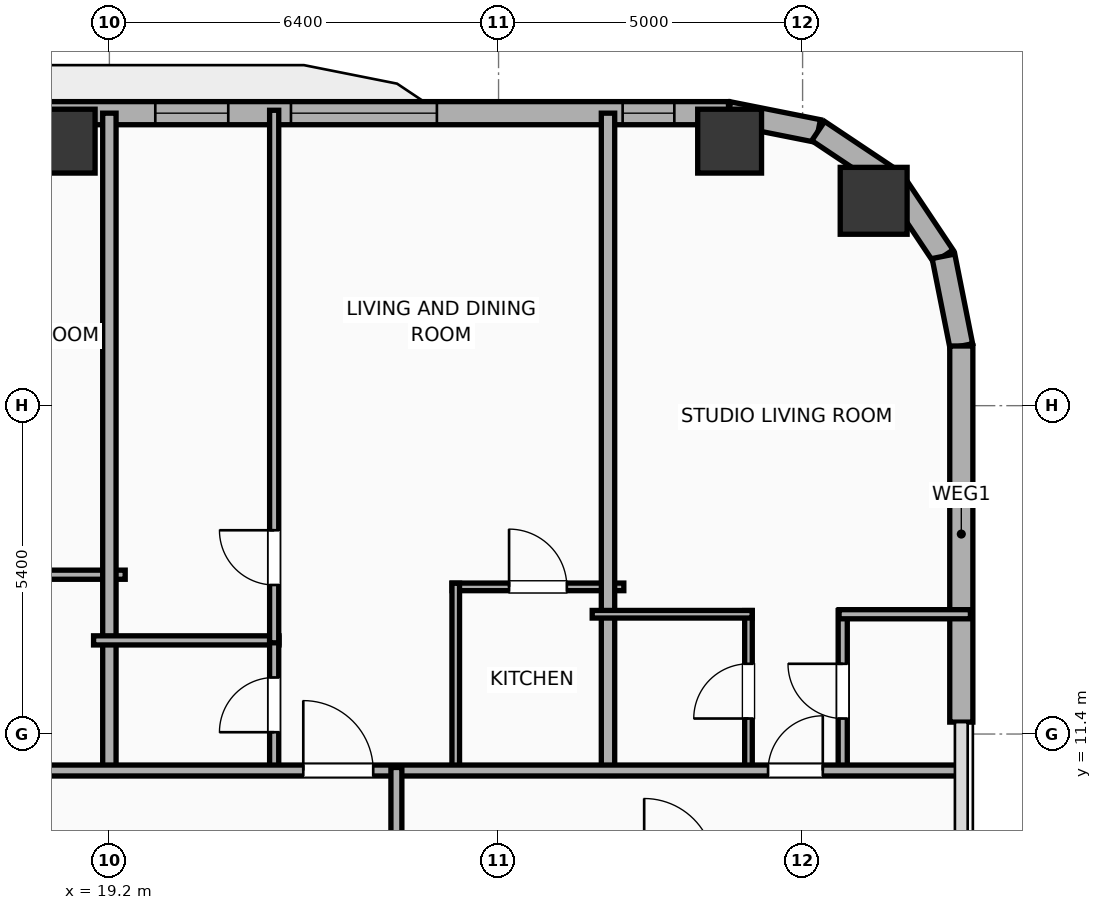
"""IFC4 building model, lengths in metres.
Left out: names, types, materials, properties, quantities, classifications, styles, units other than length and angle.
Written with IfcOpenShell. Run it as: python <this file> out.ifc"""

import sys

from ifc_helpers import new_model, si_unit, direction, frame, frame_2d, origin, origin_2d, place, context, subcontext, project, spatial, rectangle, hollow_rectangle, hollow_circle, extrude, element, fill, save


model = new_model("IFC4")
c1 = context("Model", 3, precision=1e-05, world=origin(), true_north=direction((0.0, 1.0)))
c2 = subcontext(c1, "Body", "Model", "MODEL_VIEW")
j1 = project(units=[si_unit("LENGTHUNIT", "METRE"), si_unit("PLANEANGLEUNIT", "RADIAN")], contexts=[c1])
p1 = place(None, origin())
s1 = spatial("IfcSite", under=j1, at=p1, CompositionType="ELEMENT")
p2 = place(p1, origin())
s2 = spatial("IfcBuilding", under=s1, at=p2, CompositionType="ELEMENT")
p3 = place(p2, frame((0.0, 0.0, 85.8)))
s3 = spatial("IfcBuildingStorey", under=s2, at=p3, CompositionType="ELEMENT", Elevation=85.8)
p4 = place(p3, frame((31.769, 20.169, -0.4), z_axis=(0.0, 0.0, 1.0), x_axis=(1.0, 0.0, 0.0)))
e1 = element("IfcColumn", 1, at=p4, inside=s3, PredefinedType="COLUMN", context=c2, shape_type="SweptSolid", body=[
    extrude(hollow_circle(Radius=0.55, WallThickness=0.036, at=origin_2d()), origin(), (0.0, 0.0, 1.0), 4.3),
])
for number, where, z_axis, x_axis in (
    (2, (29.4, 21.15, -0.4), (0.0, 0.0, 1.0), (1.0, 0.0, 0.0)),
    (3, (18.44, 21.15, -0.4), (0.0, 0.0, 1.0), (1.0, 0.0, 0.0)),
):
    element("IfcColumn", number, at=place(p3, frame(where, z_axis=z_axis, x_axis=x_axis)), inside=s3, PredefinedType="COLUMN", context=c2, shape_type="SweptSolid", body=[
        extrude(hollow_rectangle(XDim=1.05, YDim=1.05, WallThickness=0.036, at=origin_2d()), origin(), (0.0, 0.0, 1.0), 4.3),
    ])
p5 = place(p3, frame((-25.381, 21.61, 0.0), z_axis=(0.0, 0.0, 1.0), x_axis=(1.0, 0.0, 0.0)))
e4 = element("IfcWall", 4, at=p5, inside=s3, PredefinedType="ELEMENTEDWALL", context=c2, shape_type="SweptSolid", body=[
    extrude(rectangle(XDim=54.763, YDim=0.38, at=frame_2d((27.381, 0.0))), origin(), (0.0, 0.0, 1.0), 2.54),
])
p6 = place(p5, frame((5.645, 0.0, 0.75)))
e5 = element("IfcOpeningElement", 5, at=p6, cuts=e4, PredefinedType="OPENING", context=c2, shape_type="SweptSolid", body=[
    extrude(rectangle(XDim=2.4, YDim=1.45, at=frame_2d((1.2, 0.725))), frame((0.0, 0.2, 0.0), z_axis=(0.0, -1.0, 0.0), x_axis=(1.0, 0.0, 0.0)), (0.0, 0.0, 1.0), 0.4),
])
p7 = place(p5, frame((47.567, 0.0, 0.75)))
e6 = element("IfcOpeningElement", 6, at=p7, cuts=e4, PredefinedType="OPENING", context=c2, shape_type="SweptSolid", body=[
    extrude(rectangle(XDim=2.4, YDim=1.45, at=frame_2d((1.2, 0.725))), frame((0.0, 0.2, 0.0), z_axis=(0.0, -1.0, 0.0), x_axis=(1.0, 0.0, 0.0)), (0.0, 0.0, 1.0), 0.4),
])
p8 = place(p5, frame((1.635, 0.0, 0.55)))
e7 = element("IfcOpeningElement", 7, at=p8, cuts=e4, PredefinedType="OPENING", context=c2, shape_type="SweptSolid", body=[
    extrude(rectangle(XDim=1.2, YDim=1.15, at=frame_2d((0.6, 0.575))), frame((0.0, 0.2, 0.0), z_axis=(0.0, -1.0, 0.0), x_axis=(1.0, 0.0, 0.0)), (0.0, 0.0, 1.0), 0.4),
])
p9 = place(p5, frame((8.996, 0.0, 0.55)))
e8 = element("IfcOpeningElement", 8, at=p9, cuts=e4, PredefinedType="OPENING", context=c2, shape_type="SweptSolid", body=[
    extrude(rectangle(XDim=1.2, YDim=1.15, at=frame_2d((0.6, 0.575))), frame((0.0, 0.2, 0.0), z_axis=(0.0, -1.0, 0.0), x_axis=(1.0, 0.0, 0.0)), (0.0, 0.0, 1.0), 0.4),
])
p10 = place(p5, frame((13.576, 0.0, 0.55)))
e9 = element("IfcOpeningElement", 9, at=p10, cuts=e4, PredefinedType="OPENING", context=c2, shape_type="SweptSolid", body=[
    extrude(rectangle(XDim=1.2, YDim=1.15, at=frame_2d((0.6, 0.575))), frame((0.0, 0.2, 0.0), z_axis=(0.0, -1.0, 0.0), x_axis=(1.0, 0.0, 0.0)), (0.0, 0.0, 1.0), 0.4),
])
p11 = place(p5, frame((17.676, 0.0, 0.55)))
e10 = element("IfcOpeningElement", 10, at=p11, cuts=e4, PredefinedType="OPENING", context=c2, shape_type="SweptSolid", body=[
    extrude(rectangle(XDim=1.2, YDim=1.15, at=frame_2d((0.6, 0.575))), frame((0.0, 0.2, 0.0), z_axis=(0.0, -1.0, 0.0), x_axis=(1.0, 0.0, 0.0)), (0.0, 0.0, 1.0), 0.4),
])
p12 = place(p5, frame((20.319, 0.0, 0.55)))
e11 = element("IfcOpeningElement", 11, at=p12, cuts=e4, PredefinedType="OPENING", context=c2, shape_type="SweptSolid", body=[
    extrude(rectangle(XDim=0.85, YDim=1.15, at=frame_2d((0.425, 0.575))), frame((0.0, 0.2, 0.0), z_axis=(0.0, -1.0, 0.0), x_axis=(1.0, 0.0, 0.0)), (0.0, 0.0, 1.0), 0.4),
])
p13 = place(p5, frame((24.844, 0.0, 0.55)))
e12 = element("IfcOpeningElement", 12, at=p13, cuts=e4, PredefinedType="OPENING", context=c2, shape_type="SweptSolid", body=[
    extrude(rectangle(XDim=1.2, YDim=1.15, at=frame_2d((0.6, 0.575))), frame((0.0, 0.2, 0.0), z_axis=(0.0, -1.0, 0.0), x_axis=(1.0, 0.0, 0.0)), (0.0, 0.0, 1.0), 0.4),
])
p14 = place(p5, frame((29.976, 0.0, 0.55)))
e13 = element("IfcOpeningElement", 13, at=p14, cuts=e4, PredefinedType="OPENING", context=c2, shape_type="SweptSolid", body=[
    extrude(rectangle(XDim=1.2, YDim=1.15, at=frame_2d((0.6, 0.575))), frame((0.0, 0.2, 0.0), z_axis=(0.0, -1.0, 0.0), x_axis=(1.0, 0.0, 0.0)), (0.0, 0.0, 1.0), 0.4),
])
p15 = place(p5, frame((34.076, 0.0, 0.55)))
e14 = element("IfcOpeningElement", 14, at=p15, cuts=e4, PredefinedType="OPENING", context=c2, shape_type="SweptSolid", body=[
    extrude(rectangle(XDim=1.2, YDim=1.15, at=frame_2d((0.6, 0.575))), frame((0.0, 0.2, 0.0), z_axis=(0.0, -1.0, 0.0), x_axis=(1.0, 0.0, 0.0)), (0.0, 0.0, 1.0), 0.4),
])
p16 = place(p5, frame((38.176, 0.0, 0.55)))
e15 = element("IfcOpeningElement", 15, at=p16, cuts=e4, PredefinedType="OPENING", context=c2, shape_type="SweptSolid", body=[
    extrude(rectangle(XDim=1.2, YDim=1.15, at=frame_2d((0.6, 0.575))), frame((0.0, 0.2, 0.0), z_axis=(0.0, -1.0, 0.0), x_axis=(1.0, 0.0, 0.0)), (0.0, 0.0, 1.0), 0.4),
])
p17 = place(p5, frame((41.796, 0.0, 0.55)))
e16 = element("IfcOpeningElement", 16, at=p17, cuts=e4, PredefinedType="OPENING", context=c2, shape_type="SweptSolid", body=[
    extrude(rectangle(XDim=1.2, YDim=1.15, at=frame_2d((0.6, 0.575))), frame((0.0, 0.2, 0.0), z_axis=(0.0, -1.0, 0.0), x_axis=(1.0, 0.0, 0.0)), (0.0, 0.0, 1.0), 0.4),
])
p18 = place(p5, frame((45.336, 0.0, 0.55)))
e17 = element("IfcOpeningElement", 17, at=p18, cuts=e4, PredefinedType="OPENING", context=c2, shape_type="SweptSolid", body=[
    extrude(rectangle(XDim=1.2, YDim=1.15, at=frame_2d((0.6, 0.575))), frame((0.0, 0.2, 0.0), z_axis=(0.0, -1.0, 0.0), x_axis=(1.0, 0.0, 0.0)), (0.0, 0.0, 1.0), 0.4),
])
p19 = place(p5, frame((53.022, 0.0, 0.55)))
e18 = element("IfcOpeningElement", 18, at=p19, cuts=e4, PredefinedType="OPENING", context=c2, shape_type="SweptSolid", body=[
    extrude(rectangle(XDim=0.85, YDim=1.15, at=frame_2d((0.425, 0.575))), frame((0.0, 0.2, 0.0), z_axis=(0.0, -1.0, 0.0), x_axis=(1.0, 0.0, 0.0)), (0.0, 0.0, 1.0), 0.4),
])
p20 = place(p3, frame((29.381, 21.61, 0.0), z_axis=(0.0, 0.0, 1.0), x_axis=(0.980755066645, -0.195242155415, 0.0)))
e19 = element("IfcWall", 19, at=p20, inside=s3, PredefinedType="ELEMENTEDWALL", context=c2, shape_type="SweptSolid", body=[
    extrude(rectangle(XDim=1.504, YDim=0.38, at=frame_2d((0.752, 0.0))), origin(), (0.0, 0.0, 1.0), 2.54),
])
p21 = place(p3, frame((30.857, 21.316, 0.0), z_axis=(0.0, 0.0, 1.0), x_axis=(0.831468045563, -0.555572577804, 0.0)))
e20 = element("IfcWall", 20, at=p21, inside=s3, PredefinedType="ELEMENTEDWALL", context=c2, shape_type="SweptSolid", body=[
    extrude(rectangle(XDim=1.485, YDim=0.38, at=frame_2d((0.742, 0.0))), origin(), (0.0, 0.0, 1.0), 2.54),
])
p22 = place(p3, frame((32.091, 20.491, 0.0), z_axis=(0.0, 0.0, 1.0), x_axis=(0.555610286119, -0.831442848281, 0.0)))
e21 = element("IfcWall", 21, at=p22, inside=s3, PredefinedType="ELEMENTEDWALL", context=c2, shape_type="SweptSolid", body=[
    extrude(rectangle(XDim=1.485, YDim=0.38, at=frame_2d((0.743, 0.0))), origin(), (0.0, 0.0, 1.0), 3.65),
])
p23 = place(p3, frame((32.917, 19.257, 0.0), z_axis=(0.0, 0.0, 1.0), x_axis=(0.195086038585, -0.980786132421, 0.0)))
e22 = element("IfcWall", 22, at=p23, inside=s3, PredefinedType="ELEMENTEDWALL", context=c2, shape_type="SweptSolid", body=[
    extrude(rectangle(XDim=1.504, YDim=0.38, at=frame_2d((0.752, 0.0))), origin(), (0.0, 0.0, 1.0), 3.65),
])
p24 = place(p3, frame((33.21, 17.781, 0.0), z_axis=(0.0, 0.0, 1.0), x_axis=(0.0, -1.0, 0.0)))
e23 = element("IfcWall", 23, at=p24, inside=s3, PredefinedType="ELEMENTEDWALL", context=c2, shape_type="SweptSolid", body=[
    extrude(rectangle(XDim=6.185, YDim=0.38, at=frame_2d((3.093, 0.0))), origin(), (0.0, 0.0, 1.0), 2.54),
])
p25 = place(p3, frame((15.67, 14.02, 0.0), z_axis=(0.0, 0.0, 1.0), x_axis=(1.0, 0.0, 0.0)))
e24 = element("IfcWall", 24, at=p25, inside=s3, PredefinedType="PLUMBINGWALL", context=c2, shape_type="SweptSolid", body=[
    extrude(rectangle(XDim=3.79, YDim=0.15, at=frame_2d((1.895, 0.0))), origin(), (0.0, 0.0, 1.0), 3.65),
])
p26 = place(p3, frame((19.2, 10.72, 0.0), z_axis=(0.0, 0.0, 1.0), x_axis=(0.0, 1.0, 0.0)))
e25 = element("IfcWall", 25, at=p26, inside=s3, PredefinedType="PARTITIONING", context=c2, shape_type="SweptSolid", body=[
    extrude(rectangle(XDim=10.89, YDim=0.22, at=frame_2d((5.445, 0.0))), origin(), (0.0, 0.0, 1.0), 2.54),
])
p27 = place(p3, frame((18.94, 12.94, 0.0), z_axis=(0.0, 0.0, 1.0), x_axis=(1.0, 0.0, 0.0)))
e26 = element("IfcWall", 26, at=p27, inside=s3, PredefinedType="PLUMBINGWALL", context=c2, shape_type="SweptSolid", body=[
    extrude(rectangle(XDim=3.05, YDim=0.15, at=frame_2d((1.525, 0.0))), origin(), (0.0, 0.0, 1.0), 3.65),
])
p28 = place(p3, frame((21.91, 10.78, 0.0), z_axis=(0.0, 0.0, 1.0), x_axis=(0.0, 1.0, 0.0)))
e27 = element("IfcWall", 27, at=p28, inside=s3, PredefinedType="PLUMBINGWALL", context=c2, shape_type="SweptSolid", body=[
    extrude(rectangle(XDim=2.2, YDim=0.15, at=frame_2d((1.1, 0.0))), origin(), (0.0, 0.0, 1.0), 3.65),
])
p29 = place(p28, frame((0.65, 0.0, 0.0)))
e28 = element("IfcOpeningElement", 28, at=p29, cuts=e27, PredefinedType="OPENING", context=c2, shape_type="SweptSolid", body=[
    extrude(rectangle(XDim=0.9, YDim=2.05, at=frame_2d((0.45, 1.025))), frame((0.0, 0.085, 0.0), z_axis=(0.0, -1.0, 0.0), x_axis=(1.0, 0.0, 0.0)), (0.0, 0.0, 1.0), 0.17),
])
p30 = place(p3, frame((21.91, 12.9, 0.0), z_axis=(0.0, 0.0, 1.0), x_axis=(0.0, 1.0, 0.0)))
e29 = element("IfcWall", 29, at=p30, inside=s3, PredefinedType="PLUMBINGWALL", context=c2, shape_type="SweptSolid", body=[
    extrude(rectangle(XDim=8.758, YDim=0.15, at=frame_2d((4.379, 0.0))), origin(), (0.0, 0.0, 1.0), 3.65),
])
p31 = place(p30, frame((0.951, 0.0, 0.0)))
e30 = element("IfcOpeningElement", 30, at=p31, cuts=e29, PredefinedType="OPENING", context=c2, shape_type="SweptSolid", body=[
    extrude(rectangle(XDim=0.9, YDim=2.05, at=frame_2d((0.45, 1.025))), frame((0.0, 0.085, 0.0), z_axis=(0.0, -1.0, 0.0), x_axis=(1.0, 0.0, 0.0)), (0.0, 0.0, 1.0), 0.17),
])
p32 = place(p3, frame((24.836, 13.82, 0.0), z_axis=(0.0, 0.0, 1.0), x_axis=(1.0, 0.0, 0.0)))
e31 = element("IfcWall", 31, at=p32, inside=s3, PredefinedType="PARTITIONING", context=c2, shape_type="SweptSolid", body=[
    extrude(rectangle(XDim=2.824, YDim=0.125, at=frame_2d((1.412, 0.0))), origin(), (0.0, 0.0, 1.0), 3.65),
])
p33 = place(p32, frame((0.937, 0.0, 0.0)))
e32 = element("IfcOpeningElement", 32, at=p33, cuts=e31, PredefinedType="OPENING", context=c2, shape_type="SweptSolid", body=[
    extrude(rectangle(XDim=0.95, YDim=2.05, at=frame_2d((0.475, 1.025))), frame((0.0, 0.073, 0.0), z_axis=(0.0, -1.0, 0.0), x_axis=(1.0, 0.0, 0.0)), (0.0, 0.0, 1.0), 0.145),
])
p34 = place(p3, frame((24.896, 10.78, 0.0), z_axis=(0.0, 0.0, 1.0), x_axis=(0.0, 1.0, 0.0)))
e33 = element("IfcWall", 33, at=p34, inside=s3, PredefinedType="PARTITIONING", context=c2, shape_type="SweptSolid", body=[
    extrude(rectangle(XDim=3.1, YDim=0.125, at=frame_2d((1.55, 0.0))), origin(), (0.0, 0.0, 1.0), 3.65),
])
p35 = place(p3, frame((27.4, 10.72, 0.0), z_axis=(0.0, 0.0, 1.0), x_axis=(0.0, 1.0, 0.0)))
e34 = element("IfcWall", 34, at=p35, inside=s3, PredefinedType="PARTITIONING", context=c2, shape_type="SweptSolid", body=[
    extrude(rectangle(XDim=10.89, YDim=0.22, at=frame_2d((5.445, 0.0))), origin(), (0.0, 0.0, 1.0), 3.65),
])
p36 = place(p3, frame((29.71, 10.78, 0.0), z_axis=(0.0, 0.0, 1.0), x_axis=(0.0, 1.0, 0.0)))
e35 = element("IfcWall", 35, at=p36, inside=s3, PredefinedType="PARTITIONING", context=c2, shape_type="SweptSolid", body=[
    extrude(rectangle(XDim=2.65, YDim=0.125, at=frame_2d((1.325, 0.0))), origin(), (0.0, 0.0, 1.0), 3.65),
])
p37 = place(p36, frame((0.875, 0.0, 0.0)))
e36 = element("IfcOpeningElement", 36, at=p37, cuts=e35, PredefinedType="OPENING", context=c2, shape_type="SweptSolid", body=[
    extrude(rectangle(XDim=0.9, YDim=2.05, at=frame_2d((0.45, 1.025))), frame((0.0, 0.073, 0.0), z_axis=(0.0, -1.0, 0.0), x_axis=(1.0, 0.0, 0.0)), (0.0, 0.0, 1.0), 0.145),
])
p38 = place(p3, frame((31.26, 10.78, 0.0), z_axis=(0.0, 0.0, 1.0), x_axis=(0.0, 1.0, 0.0)))
e37 = element("IfcWall", 37, at=p38, inside=s3, PredefinedType="PLUMBINGWALL", context=c2, shape_type="SweptSolid", body=[
    extrude(rectangle(XDim=2.65, YDim=0.15, at=frame_2d((1.325, 0.0))), origin(), (0.0, 0.0, 1.0), 3.65),
])
p39 = place(p38, frame((0.875, 0.0, 0.0)))
e38 = element("IfcOpeningElement", 38, at=p39, cuts=e37, PredefinedType="OPENING", context=c2, shape_type="SweptSolid", body=[
    extrude(rectangle(XDim=0.9, YDim=2.05, at=frame_2d((0.45, 1.025))), frame((0.0, 0.085, 0.0), z_axis=(0.0, -1.0, 0.0), x_axis=(1.0, 0.0, 0.0)), (0.0, 0.0, 1.0), 0.17),
])
p40 = place(p3, frame((27.14, 13.37, 0.0), z_axis=(0.0, 0.0, 1.0), x_axis=(1.0, 0.0, 0.0)))
e39 = element("IfcWall", 39, at=p40, inside=s3, PredefinedType="PARTITIONING", context=c2, shape_type="SweptSolid", body=[
    extrude(rectangle(XDim=2.63, YDim=0.125, at=frame_2d((1.315, 0.0))), origin(), (0.0, 0.0, 1.0), 3.65),
])
p41 = place(p3, frame((31.2, 13.37, 0.0), z_axis=(0.0, 0.0, 1.0), x_axis=(1.0, 0.0, 0.0)))
e40 = element("IfcWall", 40, at=p41, inside=s3, PredefinedType="PLUMBINGWALL", context=c2, shape_type="SweptSolid", body=[
    extrude(rectangle(XDim=2.16, YDim=0.15, at=frame_2d((1.08, 0.0))), origin(), (0.0, 0.0, 1.0), 3.65),
])
p42 = place(p3, frame((-29.21, 10.8, 0.0), z_axis=(0.0, 0.0, 1.0), x_axis=(1.0, 0.0, 0.0)))
e41 = element("IfcWall", 41, at=p42, inside=s3, PredefinedType="PARTITIONING", context=c2, shape_type="SweptSolid", body=[
    extrude(rectangle(XDim=62.42, YDim=0.18, at=frame_2d((31.21, 0.0))), origin(), (0.0, 0.0, 1.0), 3.65),
])
p43 = place(p42, frame((3.264, 0.0, 0.0)))
e42 = element("IfcOpeningElement", 42, at=p43, cuts=e41, PredefinedType="OPENING", context=c2, shape_type="SweptSolid", body=[
    extrude(rectangle(XDim=1.15, YDim=2.05, at=frame_2d((0.575, 1.025))), frame((0.0, 0.1, 0.0), z_axis=(0.0, -1.0, 0.0), x_axis=(1.0, 0.0, 0.0)), (0.0, 0.0, 1.0), 0.2),
])
p44 = place(p42, frame((11.116, 0.0, 0.0)))
e43 = element("IfcOpeningElement", 43, at=p44, cuts=e41, PredefinedType="OPENING", context=c2, shape_type="SweptSolid", body=[
    extrude(rectangle(XDim=1.15, YDim=2.05, at=frame_2d((0.575, 1.025))), frame((0.0, 0.1, 0.0), z_axis=(0.0, -1.0, 0.0), x_axis=(1.0, 0.0, 0.0)), (0.0, 0.0, 1.0), 0.2),
])
p45 = place(p42, frame((19.3, 0.0, 0.0)))
e44 = element("IfcOpeningElement", 44, at=p45, cuts=e41, PredefinedType="OPENING", context=c2, shape_type="SweptSolid", body=[
    extrude(rectangle(XDim=1.15, YDim=2.05, at=frame_2d((0.575, 1.025))), frame((0.0, 0.1, 0.0), z_axis=(0.0, -1.0, 0.0), x_axis=(1.0, 0.0, 0.0)), (0.0, 0.0, 1.0), 0.2),
])
p46 = place(p42, frame((27.452, 0.0, 0.0)))
e45 = element("IfcOpeningElement", 45, at=p46, cuts=e41, PredefinedType="OPENING", context=c2, shape_type="SweptSolid", body=[
    extrude(rectangle(XDim=1.15, YDim=2.05, at=frame_2d((0.575, 1.025))), frame((0.0, 0.1, 0.0), z_axis=(0.0, -1.0, 0.0), x_axis=(1.0, 0.0, 0.0)), (0.0, 0.0, 1.0), 0.2),
])
p47 = place(p42, frame((35.697, 0.0, 0.0)))
e46 = element("IfcOpeningElement", 46, at=p47, cuts=e41, PredefinedType="OPENING", context=c2, shape_type="SweptSolid", body=[
    extrude(rectangle(XDim=1.15, YDim=2.05, at=frame_2d((0.575, 1.025))), frame((0.0, 0.1, 0.0), z_axis=(0.0, -1.0, 0.0), x_axis=(1.0, 0.0, 0.0)), (0.0, 0.0, 1.0), 0.2),
])
p48 = place(p42, frame((43.899, 0.0, 0.0)))
e47 = element("IfcOpeningElement", 47, at=p48, cuts=e41, PredefinedType="OPENING", context=c2, shape_type="SweptSolid", body=[
    extrude(rectangle(XDim=1.15, YDim=2.05, at=frame_2d((0.575, 1.025))), frame((0.0, 0.1, 0.0), z_axis=(0.0, -1.0, 0.0), x_axis=(1.0, 0.0, 0.0)), (0.0, 0.0, 1.0), 0.2),
])
p49 = place(p42, frame((51.599, 0.0, 0.0)))
e48 = element("IfcOpeningElement", 48, at=p49, cuts=e41, PredefinedType="OPENING", context=c2, shape_type="SweptSolid", body=[
    extrude(rectangle(XDim=1.15, YDim=2.05, at=frame_2d((0.575, 1.025))), frame((0.0, 0.1, 0.0), z_axis=(0.0, -1.0, 0.0), x_axis=(1.0, 0.0, 0.0)), (0.0, 0.0, 1.0), 0.2),
])
p50 = place(p42, frame((59.242, 0.0, 0.0)))
e49 = element("IfcOpeningElement", 49, at=p50, cuts=e41, PredefinedType="OPENING", context=c2, shape_type="SweptSolid", body=[
    extrude(rectangle(XDim=0.9, YDim=2.05, at=frame_2d((0.45, 1.025))), frame((0.0, 0.1, 0.0), z_axis=(0.0, -1.0, 0.0), x_axis=(1.0, 0.0, 0.0)), (0.0, 0.0, 1.0), 0.2),
])
p51 = place(p3, frame((23.92, -10.85, 0.0), z_axis=(0.0, 0.0, 1.0), x_axis=(0.0, 1.0, 0.0)))
e50 = element("IfcWall", 50, at=p51, inside=s3, PredefinedType="PARTITIONING", context=c2, shape_type="SweptSolid", body=[
    extrude(rectangle(XDim=21.7, YDim=0.18, at=frame_2d((10.85, 0.0))), origin(), (0.0, 0.0, 1.0), 3.65),
])
p52 = place(p51, frame((18.835, 0.0, 0.0)))
e51 = element("IfcOpeningElement", 51, at=p52, cuts=e50, PredefinedType="OPENING", context=c2, shape_type="SweptSolid", body=[
    extrude(rectangle(XDim=0.95, YDim=2.05, at=frame_2d((0.475, 1.025))), frame((0.0, 0.1, 0.0), z_axis=(0.0, -1.0, 0.0), x_axis=(1.0, 0.0, 0.0)), (0.0, 0.0, 1.0), 0.2),
])
p53 = place(p7, origin())
e52 = element("IfcWindow", 52, at=p53, inside=s3, PartitioningType="SINGLE_PANEL", PredefinedType="WINDOW", context=c2, shape_type="SweptSolid", body=[
    extrude(rectangle(XDim=2.4, YDim=1.45, at=frame_2d((1.2, 0.725))), frame((0.0, 0.03, 0.0), z_axis=(0.0, -1.0, 0.0), x_axis=(1.0, 0.0, 0.0)), (0.0, 0.0, 1.0), 0.06),
])
fill(e6, e52)
p54 = place(p18, origin())
e53 = element("IfcWindow", 53, at=p54, inside=s3, PartitioningType="SINGLE_PANEL", PredefinedType="WINDOW", context=c2, shape_type="SweptSolid", body=[
    extrude(rectangle(XDim=1.2, YDim=1.15, at=frame_2d((0.6, 0.575))), frame((0.0, 0.03, 0.0), z_axis=(0.0, -1.0, 0.0), x_axis=(1.0, 0.0, 0.0)), (0.0, 0.0, 1.0), 0.06),
])
fill(e17, e53)
p55 = place(p19, origin())
e54 = element("IfcWindow", 54, at=p55, inside=s3, PartitioningType="SINGLE_PANEL", PredefinedType="WINDOW", context=c2, shape_type="SweptSolid", body=[
    extrude(rectangle(XDim=0.85, YDim=1.15, at=frame_2d((0.425, 0.575))), frame((0.0, 0.03, 0.0), z_axis=(0.0, -1.0, 0.0), x_axis=(1.0, 0.0, 0.0)), (0.0, 0.0, 1.0), 0.06),
])
fill(e18, e54)
p56 = place(p29, origin())
e55 = element("IfcDoor", 55, at=p56, inside=s3, OperationType="SINGLE_SWING_LEFT", PredefinedType="DOOR", context=c2, shape_type="SweptSolid", body=[
    extrude(rectangle(XDim=0.9, YDim=2.05, at=frame_2d((0.45, 1.025))), frame((0.0, 0.025, 0.0), z_axis=(0.0, -1.0, 0.0), x_axis=(1.0, 0.0, 0.0)), (0.0, 0.0, 1.0), 0.05),
])
fill(e28, e55)
p57 = place(p31, origin())
e56 = element("IfcDoor", 56, at=p57, inside=s3, OperationType="SINGLE_SWING_RIGHT", PredefinedType="DOOR", context=c2, shape_type="SweptSolid", body=[
    extrude(rectangle(XDim=0.9, YDim=2.05, at=frame_2d((0.45, 1.025))), frame((0.0, 0.025, 0.0), z_axis=(0.0, -1.0, 0.0), x_axis=(1.0, 0.0, 0.0)), (0.0, 0.0, 1.0), 0.05),
])
fill(e30, e56)
p58 = place(p33, origin())
e57 = element("IfcDoor", 57, at=p58, inside=s3, OperationType="SINGLE_SWING_LEFT", PredefinedType="DOOR", context=c2, shape_type="SweptSolid", body=[
    extrude(rectangle(XDim=0.95, YDim=2.05, at=frame_2d((0.475, 1.025))), frame((0.0, 0.025, 0.0), z_axis=(0.0, -1.0, 0.0), x_axis=(1.0, 0.0, 0.0)), (0.0, 0.0, 1.0), 0.05),
])
fill(e32, e57)
p59 = place(p37, origin())
e58 = element("IfcDoor", 58, at=p59, inside=s3, OperationType="SINGLE_SWING_LEFT", PredefinedType="DOOR", context=c2, shape_type="SweptSolid", body=[
    extrude(rectangle(XDim=0.9, YDim=2.05, at=frame_2d((0.45, 1.025))), frame((0.0, 0.025, 0.0), z_axis=(0.0, -1.0, 0.0), x_axis=(1.0, 0.0, 0.0)), (0.0, 0.0, 1.0), 0.05),
])
fill(e36, e58)
p60 = place(p39, origin())
e59 = element("IfcDoor", 59, at=p60, inside=s3, OperationType="SINGLE_SWING_RIGHT", PredefinedType="DOOR", context=c2, shape_type="SweptSolid", body=[
    extrude(rectangle(XDim=0.9, YDim=2.05, at=frame_2d((0.45, 1.025))), frame((0.0, 0.025, 0.0), z_axis=(0.0, -1.0, 0.0), x_axis=(1.0, 0.0, 0.0)), (0.0, 0.0, 1.0), 0.05),
])
fill(e38, e59)
p61 = place(p49, origin())
e60 = element("IfcDoor", 60, at=p61, inside=s3, OperationType="SINGLE_SWING_LEFT", PredefinedType="DOOR", context=c2, shape_type="SweptSolid", body=[
    extrude(rectangle(XDim=1.15, YDim=2.05, at=frame_2d((0.575, 1.025))), frame((0.0, 0.025, 0.0), z_axis=(0.0, -1.0, 0.0), x_axis=(1.0, 0.0, 0.0)), (0.0, 0.0, 1.0), 0.05),
])
fill(e48, e60)
p62 = place(p50, origin())
e61 = element("IfcDoor", 61, at=p62, inside=s3, OperationType="SINGLE_SWING_RIGHT", PredefinedType="DOOR", context=c2, shape_type="SweptSolid", body=[
    extrude(rectangle(XDim=0.9, YDim=2.05, at=frame_2d((0.45, 1.025))), frame((0.0, 0.025, 0.0), z_axis=(0.0, -1.0, 0.0), x_axis=(1.0, 0.0, 0.0)), (0.0, 0.0, 1.0), 0.05),
])
fill(e49, e61)
save(model, sys.argv[1])
